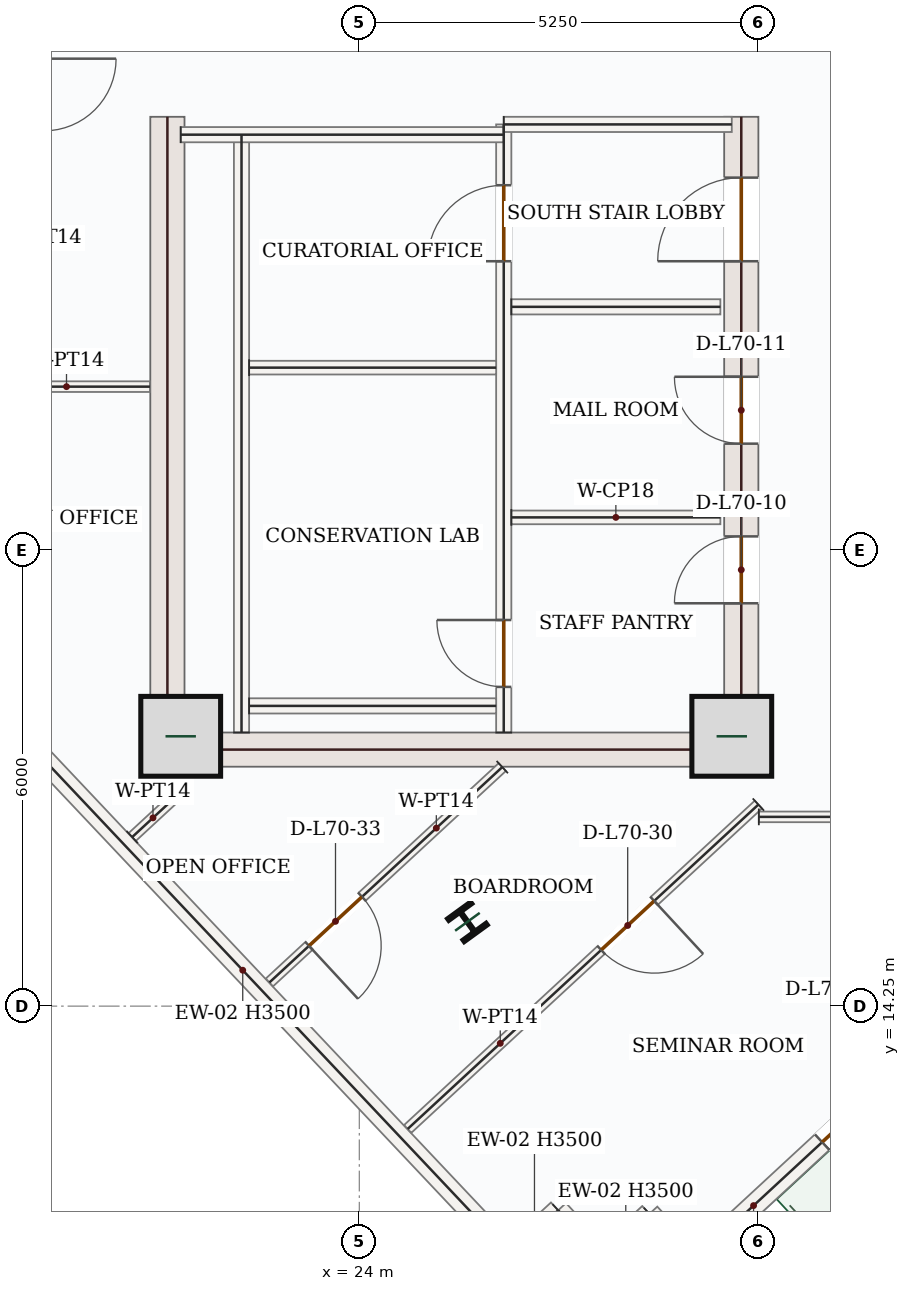
"""IFC4 building model, lengths in metres.
Left out: names, types, materials, properties, quantities, classifications, styles, units other than length and angle.
Written with IfcOpenShell. Run it as: python <this file> out.ifc"""

import sys

from ifc_helpers import new_model, si_unit, direction, frame, frame_2d, origin, origin_2d, place, context, subcontext, project, spatial, rectangle, i_section, extrude, source, transform, mapped, element, fill, save


model = new_model("IFC4")
c1 = context("Model", 3, precision=1e-05, world=origin(), true_north=direction((0.0, 1.0)))
c2 = subcontext(c1, "Body", "Model", "MODEL_VIEW")
j1 = project(units=[si_unit("LENGTHUNIT", "METRE"), si_unit("PLANEANGLEUNIT", "RADIAN")], contexts=[c1])
p1 = place(None, origin())
s1 = spatial("IfcSite", under=j1, at=p1, CompositionType="ELEMENT")
p2 = place(p1, origin())
s2 = spatial("IfcBuilding", under=s1, at=p2, CompositionType="ELEMENT")
p3 = place(p2, frame((0.0, 0.0, 291.6)))
s3 = spatial("IfcBuildingStorey", under=s2, at=p3, CompositionType="ELEMENT", Elevation=291.6)
m1 = source(origin(), c2, "Body", "SweptSolid", [
    extrude(rectangle(XDim=8.55, YDim=0.45, at=frame_2d((4.275, 0.0))), origin(), (0.0, 0.0, 1.0), 3.5),
])
p4 = place(p3, frame((21.475, 17.4, 0.0), z_axis=(0.0, 0.0, 1.0), x_axis=(0.0, 1.0, 0.0)))
e1 = element("IfcWall", 1, at=p4, inside=s3, PredefinedType="SHEAR", context=c2, shape_type="MappedRepresentation", body=[
    mapped(m1, transform((0.0, 0.0, 0.0), x_axis=(1.0, 0.0, 0.0), y_axis=(0.0, 1.0, 0.0), z_axis=(0.0, 0.0, 1.0), scale=1.0)),
])
p5 = place(p3, frame((29.025, 17.4, 0.0), z_axis=(0.0, 0.0, 1.0), x_axis=(0.0, 1.0, 0.0)))
e2 = element("IfcWall", 2, at=p5, inside=s3, PredefinedType="SHEAR", context=c2, shape_type="SweptSolid", body=[
    extrude(rectangle(XDim=8.55, YDim=0.45, at=frame_2d((4.275, 0.0))), origin(), (0.0, 0.0, 1.0), 3.5),
])
p6 = place(p5, frame((6.65, 0.0, 0.0)))
e3 = element("IfcOpeningElement", 3, at=p6, cuts=e2, PredefinedType="OPENING", context=c2, shape_type="SweptSolid", body=[
    extrude(rectangle(XDim=1.1, YDim=2.2, at=frame_2d((0.55, 1.1))), frame((0.0, 0.235, 0.0), z_axis=(0.0, -1.0, 0.0), x_axis=(1.0, 0.0, 0.0)), (0.0, 0.0, 1.0), 0.47),
])
p7 = place(p5, frame((2.15, 0.0, 0.0)))
e4 = element("IfcOpeningElement", 4, at=p7, cuts=e2, PredefinedType="OPENING", context=c2, shape_type="SweptSolid", body=[
    extrude(rectangle(XDim=0.88, YDim=2.1, at=frame_2d((0.44, 1.05))), frame((0.0, 0.235, 0.0), z_axis=(0.0, -1.0, 0.0), x_axis=(1.0, 0.0, 0.0)), (0.0, 0.0, 1.0), 0.47),
])
p8 = place(p5, frame((4.25, 0.0, 0.0)))
e5 = element("IfcOpeningElement", 5, at=p8, cuts=e2, PredefinedType="OPENING", context=c2, shape_type="SweptSolid", body=[
    extrude(rectangle(XDim=0.88, YDim=2.1, at=frame_2d((0.44, 1.05))), frame((0.0, 0.235, 0.0), z_axis=(0.0, -1.0, 0.0), x_axis=(1.0, 0.0, 0.0)), (0.0, 0.0, 1.0), 0.47),
])
m2 = source(origin(), c2, "Body", "SweptSolid", [
    extrude(rectangle(XDim=7.1, YDim=0.45, at=frame_2d((3.55, 0.0))), origin(), (0.0, 0.0, 1.0), 3.5),
])
p9 = place(p3, frame((21.7, 17.625, 0.0), z_axis=(0.0, 0.0, 1.0), x_axis=(1.0, 0.0, 0.0)))
e6 = element("IfcWall", 6, at=p9, inside=s3, PredefinedType="SHEAR", context=c2, shape_type="MappedRepresentation", body=[
    mapped(m2, transform((0.0, 0.0, 0.0), x_axis=(1.0, 0.0, 0.0), y_axis=(0.0, 1.0, 0.0), z_axis=(0.0, 0.0, 1.0), scale=1.0)),
])
m3 = source(origin(), c2, "Body", "SweptSolid", [
    extrude(rectangle(XDim=1.05, YDim=1.05, at=origin_2d()), origin(), (0.0, 0.0, 1.0), 3.75),
])
for number, where, z_axis, x_axis in (
    (7, (21.65, 17.8, 0.0), (0.0, 0.0, 1.0), (1.0, 0.0, 0.0)),
    (8, (28.9, 17.8, 0.0), (0.0, 0.0, 1.0), (1.0, 0.0, 0.0)),
):
    element("IfcColumn", number, at=place(p3, frame(where, z_axis=z_axis, x_axis=x_axis)), inside=s3, PredefinedType="COLUMN", context=c2, shape_type="MappedRepresentation", body=[
        mapped(m3, transform((0.0, 0.0, 0.0), x_axis=(1.0, 0.0, 0.0), y_axis=(0.0, 1.0, 0.0), z_axis=(0.0, 0.0, 1.0), scale=1.0)),
    ])
m4 = source(origin(), c2, "Body", "SweptSolid", [
    extrude(i_section(OverallWidth=0.374, OverallDepth=0.372, WebThickness=0.016, FlangeThickness=0.026, FilletRadius=0.018, at=origin_2d()), origin(), (0.0, 0.0, 1.0), 3.75),
])
p10 = place(p3, frame((25.422, 15.359, 0.0), z_axis=(0.0, 0.0, 1.0), x_axis=(0.809016994375, 0.587785252292, 0.0)))
e9 = element("IfcColumn", 9, at=p10, inside=s3, PredefinedType="COLUMN", context=c2, shape_type="MappedRepresentation", body=[
    mapped(m4, transform((0.0, 0.0, 0.0), x_axis=(1.0, 0.0, 0.0), y_axis=(0.0, 1.0, 0.0), z_axis=(0.0, 0.0, 1.0), scale=1.0)),
])
p11 = place(p3, frame((32.553, 14.74, 0.0), z_axis=(0.0, 0.0, 1.0), x_axis=(-0.734109106874, -0.679031530346, 0.0)))
e10 = element("IfcWall", 10, at=p11, inside=s3, PredefinedType="SOLIDWALL", context=c2, shape_type="SweptSolid", body=[
    extrude(rectangle(XDim=5.665, YDim=0.28, at=frame_2d((2.833, 0.0))), origin(), (0.0, 0.0, 1.0), 3.5),
])
p12 = place(p11, frame((2.307, 0.0, 0.0)))
e11 = element("IfcOpeningElement", 11, at=p12, cuts=e10, PredefinedType="OPENING", context=c2, shape_type="SweptSolid", body=[
    extrude(rectangle(XDim=1.05, YDim=2.15, at=frame_2d((0.525, 1.075))), frame((0.0, 0.15, 0.0), z_axis=(0.0, -1.0, 0.0), x_axis=(1.0, 0.0, 0.0)), (0.0, 0.0, 1.0), 0.3),
])
m5 = source(origin(), c2, "Body", "SweptSolid", [
    extrude(rectangle(XDim=0.85, YDim=0.28, at=frame_2d((0.425, 0.0))), origin(), (0.0, 0.0, 1.0), 3.5),
])
for number, where, z_axis, x_axis in (
    (12, (28.395, 10.893, 0.0), (0.0, 0.0, 1.0), (-0.679, 0.734, 0.0)),
    (13, (27.817, 11.517, 0.0), (0.0, 0.0, 1.0), (-0.734, -0.679, 0.0)),
    (14, (27.193, 10.94, 0.0), (0.0, 0.0, 1.0), (-0.679, 0.734, 0.0)),
    (15, (26.616, 11.564, 0.0), (0.0, 0.0, 1.0), (-0.734, -0.679, 0.0)),
):
    element("IfcWall", number, at=place(p3, frame(where, z_axis=z_axis, x_axis=x_axis)), inside=s3, PredefinedType="SOLIDWALL", context=c2, shape_type="MappedRepresentation", body=[
        mapped(m5, transform((0.0, 0.0, 0.0), x_axis=(1.0, 0.0, 0.0), y_axis=(0.0, 1.0, 0.0), z_axis=(0.0, 0.0, 1.0), scale=1.0)),
    ])
m6 = source(origin(), c2, "Body", "SweptSolid", [
    extrude(rectangle(XDim=10.274, YDim=0.28, at=frame_2d((5.137, 0.0))), origin(), (0.0, 0.0, 1.0), 3.5),
])
p13 = place(p3, frame((25.992, 10.987, 0.0), z_axis=(0.0, 0.0, 1.0), x_axis=(-0.68643580465, 0.727190405667, 0.0)))
e16 = element("IfcWall", 16, at=p13, inside=s3, PredefinedType="SOLIDWALL", context=c2, shape_type="MappedRepresentation", body=[
    mapped(m6, transform((0.0, 0.0, 0.0), x_axis=(1.0, 0.0, 0.0), y_axis=(0.0, 1.0, 0.0), z_axis=(0.0, 0.0, 1.0), scale=1.0)),
])
m7 = source(origin(), c2, "Body", "SweptSolid", [
    extrude(rectangle(XDim=7.87, YDim=0.2, at=frame_2d((3.935, 0.0))), origin(), (0.0, 0.0, 1.0), 3.5),
])
p14 = place(p3, frame((22.45, 17.85, 0.0), z_axis=(0.0, 0.0, 1.0), x_axis=(0.0, 1.0, 0.0)))
e17 = element("IfcWall", 17, at=p14, inside=s3, PredefinedType="SOLIDWALL", context=c2, shape_type="MappedRepresentation", body=[
    mapped(m7, transform((0.0, 0.0, 0.0), x_axis=(1.0, 0.0, 0.0), y_axis=(0.0, 1.0, 0.0), z_axis=(0.0, 0.0, 1.0), scale=1.0)),
])
p15 = place(p3, frame((25.9, 17.85, 0.0), z_axis=(0.0, 0.0, 1.0), x_axis=(0.0, 1.0, 0.0)))
e18 = element("IfcWall", 18, at=p15, inside=s3, PredefinedType="SOLIDWALL", context=c2, shape_type="SweptSolid", body=[
    extrude(rectangle(XDim=8.0, YDim=0.2, at=frame_2d((4.0, 0.0))), origin(), (0.0, 0.0, 1.0), 3.5),
])
p16 = place(p15, frame((6.2, 0.0, 0.0)))
e19 = element("IfcOpeningElement", 19, at=p16, cuts=e18, PredefinedType="OPENING", context=c2, shape_type="SweptSolid", body=[
    extrude(rectangle(XDim=1.0, YDim=2.15, at=frame_2d((0.5, 1.075))), frame((0.0, 0.11, 0.0), z_axis=(0.0, -1.0, 0.0), x_axis=(1.0, 0.0, 0.0)), (0.0, 0.0, 1.0), 0.22),
])
p17 = place(p15, frame((0.6, 0.0, 0.0)))
e20 = element("IfcOpeningElement", 20, at=p17, cuts=e18, PredefinedType="OPENING", context=c2, shape_type="SweptSolid", body=[
    extrude(rectangle(XDim=0.88, YDim=2.1, at=frame_2d((0.44, 1.05))), frame((0.0, 0.11, 0.0), z_axis=(0.0, -1.0, 0.0), x_axis=(1.0, 0.0, 0.0)), (0.0, 0.0, 1.0), 0.22),
])
m8 = source(origin(), c2, "Body", "SweptSolid", [
    extrude(rectangle(XDim=4.25, YDim=0.2, at=frame_2d((2.125, 0.0))), origin(), (0.0, 0.0, 1.0), 3.5),
])
p18 = place(p3, frame((21.65, 25.715, 0.0), z_axis=(0.0, 0.0, 1.0), x_axis=(1.0, 0.0, 0.0)))
e21 = element("IfcWall", 21, at=p18, inside=s3, PredefinedType="SOLIDWALL", context=c2, shape_type="MappedRepresentation", body=[
    mapped(m8, transform((0.0, 0.0, 0.0), x_axis=(1.0, 0.0, 0.0), y_axis=(0.0, 1.0, 0.0), z_axis=(0.0, 0.0, 1.0), scale=1.0)),
])
m9 = source(origin(), c2, "Body", "SweptSolid", [
    extrude(rectangle(XDim=3.0, YDim=0.2, at=frame_2d((1.5, 0.0))), origin(), (0.0, 0.0, 1.0), 3.5),
])
p19 = place(p3, frame((25.9, 25.85, 0.0), z_axis=(0.0, 0.0, 1.0), x_axis=(1.0, 0.0, 0.0)))
e22 = element("IfcWall", 22, at=p19, inside=s3, PredefinedType="SOLIDWALL", context=c2, shape_type="MappedRepresentation", body=[
    mapped(m9, transform((0.0, 0.0, 0.0), x_axis=(1.0, 0.0, 0.0), y_axis=(0.0, 1.0, 0.0), z_axis=(0.0, 0.0, 1.0), scale=1.0)),
])
m10 = source(origin(), c2, "Body", "SweptSolid", [
    extrude(rectangle(XDim=3.25, YDim=0.2, at=frame_2d((1.625, 0.0))), origin(), (0.0, 0.0, 1.0), 3.5),
])
p20 = place(p3, frame((22.55, 18.2, 0.0), z_axis=(0.0, 0.0, 1.0), x_axis=(1.0, 0.0, 0.0)))
e23 = element("IfcWall", 23, at=p20, inside=s3, PredefinedType="SOLIDWALL", context=c2, shape_type="MappedRepresentation", body=[
    mapped(m10, transform((0.0, 0.0, 0.0), x_axis=(1.0, 0.0, 0.0), y_axis=(0.0, 1.0, 0.0), z_axis=(0.0, 0.0, 1.0), scale=1.0)),
])
m11 = source(origin(), c2, "Body", "SweptSolid", [
    extrude(rectangle(XDim=3.25, YDim=0.18, at=frame_2d((1.625, 0.0))), origin(), (0.0, 0.0, 1.0), 3.5),
])
p21 = place(p3, frame((22.55, 22.65, 0.0), z_axis=(0.0, 0.0, 1.0), x_axis=(1.0, 0.0, 0.0)))
e24 = element("IfcWall", 24, at=p21, inside=s3, PredefinedType="PARTITIONING", context=c2, shape_type="MappedRepresentation", body=[
    mapped(m11, transform((0.0, 0.0, 0.0), x_axis=(1.0, 0.0, 0.0), y_axis=(0.0, 1.0, 0.0), z_axis=(0.0, 0.0, 1.0), scale=1.0)),
])
m12 = source(origin(), c2, "Body", "SweptSolid", [
    extrude(rectangle(XDim=2.75, YDim=0.2, at=frame_2d((1.375, 0.0))), origin(), (0.0, 0.0, 1.0), 3.5),
])
p22 = place(p3, frame((26.0, 23.45, 0.0), z_axis=(0.0, 0.0, 1.0), x_axis=(1.0, 0.0, 0.0)))
e25 = element("IfcWall", 25, at=p22, inside=s3, PredefinedType="SOLIDWALL", context=c2, shape_type="MappedRepresentation", body=[
    mapped(m12, transform((0.0, 0.0, 0.0), x_axis=(1.0, 0.0, 0.0), y_axis=(0.0, 1.0, 0.0), z_axis=(0.0, 0.0, 1.0), scale=1.0)),
])
m13 = source(origin(), c2, "Body", "SweptSolid", [
    extrude(rectangle(XDim=2.75, YDim=0.18, at=frame_2d((1.375, 0.0))), origin(), (0.0, 0.0, 1.0), 3.5),
])
p23 = place(p3, frame((26.0, 20.68, 0.0), z_axis=(0.0, 0.0, 1.0), x_axis=(1.0, 0.0, 0.0)))
e26 = element("IfcWall", 26, at=p23, inside=s3, PredefinedType="PARTITIONING", context=c2, shape_type="MappedRepresentation", body=[
    mapped(m13, transform((0.0, 0.0, 0.0), x_axis=(1.0, 0.0, 0.0), y_axis=(0.0, 1.0, 0.0), z_axis=(0.0, 0.0, 1.0), scale=1.0)),
])
p24 = place(p3, frame((25.881, 17.395, 0.0), z_axis=(0.0, 0.0, 1.0), x_axis=(-0.734127876216, -0.679011238024, 0.0)))
e27 = element("IfcWall", 27, at=p24, inside=s3, PredefinedType="PARTITIONING", context=c2, shape_type="SweptSolid", body=[
    extrude(rectangle(XDim=4.173, YDim=0.14, at=frame_2d((2.086, 0.0))), origin(), (0.0, 0.0, 1.0), 3.5),
])
p25 = place(p24, frame((2.514, 0.0, 0.0)))
e28 = element("IfcOpeningElement", 28, at=p25, cuts=e27, PredefinedType="OPENING", context=c2, shape_type="SweptSolid", body=[
    extrude(rectangle(XDim=0.95, YDim=2.15, at=frame_2d((0.475, 1.075))), frame((0.0, 0.08, 0.0), z_axis=(0.0, -1.0, 0.0), x_axis=(1.0, 0.0, 0.0)), (0.0, 0.0, 1.0), 0.16),
])
m14 = source(origin(), c2, "Body", "SweptSolid", [
    extrude(rectangle(XDim=0.745, YDim=0.14, at=frame_2d((0.373, 0.0))), origin(), (0.0, 0.0, 1.0), 3.5),
])
p26 = place(p3, frame((21.012, 16.474, 0.0), z_axis=(0.0, 0.0, 1.0), x_axis=(0.734262819455, 0.678865312095, 0.0)))
e29 = element("IfcWall", 29, at=p26, inside=s3, PredefinedType="PARTITIONING", context=c2, shape_type="MappedRepresentation", body=[
    mapped(m14, transform((0.0, 0.0, 0.0), x_axis=(1.0, 0.0, 0.0), y_axis=(0.0, 1.0, 0.0), z_axis=(0.0, 0.0, 1.0), scale=1.0)),
])
p27 = place(p3, frame((29.25, 16.902, 0.0), z_axis=(0.0, 0.0, 1.0), x_axis=(-0.734113479195, -0.679026803347, 0.0)))
e30 = element("IfcWall", 30, at=p27, inside=s3, PredefinedType="PARTITIONING", context=c2, shape_type="SweptSolid", body=[
    extrude(rectangle(XDim=6.284, YDim=0.14, at=frame_2d((3.142, 0.0))), origin(), (0.0, 0.0, 1.0), 3.5),
])
p28 = place(p27, frame((1.867, 0.0, 0.0)))
e31 = element("IfcOpeningElement", 31, at=p28, cuts=e30, PredefinedType="OPENING", context=c2, shape_type="SweptSolid", body=[
    extrude(rectangle(XDim=0.95, YDim=2.15, at=frame_2d((0.475, 1.075))), frame((0.0, 0.08, 0.0), z_axis=(0.0, -1.0, 0.0), x_axis=(1.0, 0.0, 0.0)), (0.0, 0.0, 1.0), 0.16),
])
m15 = source(origin(), c2, "Body", "SweptSolid", [
    extrude(rectangle(XDim=2.195, YDim=0.14, at=frame_2d((1.098, 0.0))), origin(), (0.0, 0.0, 1.0), 3.5),
])
p29 = place(p3, frame((19.05, 22.4, 0.0), z_axis=(0.0, 0.0, 1.0), x_axis=(1.0, 0.0, 0.0)))
e32 = element("IfcWall", 32, at=p29, inside=s3, PredefinedType="PARTITIONING", context=c2, shape_type="MappedRepresentation", body=[
    mapped(m15, transform((0.0, 0.0, 0.0), x_axis=(1.0, 0.0, 0.0), y_axis=(0.0, 1.0, 0.0), z_axis=(0.0, 0.0, 1.0), scale=1.0)),
])
p30 = place(p3, frame((29.256, 16.74, 0.0), z_axis=(0.0, 0.0, 1.0), x_axis=(1.0, 0.0, 0.0)))
e33 = element("IfcWall", 33, at=p30, inside=s3, PredefinedType="PARTITIONING", context=c2, shape_type="SweptSolid", body=[
    extrude(rectangle(XDim=6.354, YDim=0.14, at=frame_2d((3.177, 0.0))), origin(), (0.0, 0.0, 1.0), 3.5),
])
p31 = place(p30, frame((4.215, 0.0, 0.0)))
e34 = element("IfcOpeningElement", 34, at=p31, cuts=e33, PredefinedType="OPENING", context=c2, shape_type="SweptSolid", body=[
    extrude(rectangle(XDim=0.95, YDim=2.15, at=frame_2d((0.475, 1.075))), frame((0.0, 0.08, 0.0), z_axis=(0.0, -1.0, 0.0), x_axis=(1.0, 0.0, 0.0)), (0.0, 0.0, 1.0), 0.16),
])
m16 = source(origin(), c2, "Body", "SweptSolid", [
    extrude(rectangle(XDim=1.05, YDim=2.15, at=frame_2d((0.525, 1.075))), frame((0.0, 0.025, 0.0), z_axis=(0.0, -1.0, 0.0), x_axis=(1.0, 0.0, 0.0)), (0.0, 0.0, 1.0), 0.05),
])
p32 = place(p12, origin())
e35 = element("IfcDoor", 35, at=p32, inside=s3, OperationType="SINGLE_SWING_LEFT", PredefinedType="DOOR", context=c2, shape_type="MappedRepresentation", body=[
    mapped(m16, transform((0.0, 0.0, 0.0), x_axis=(1.0, 0.0, 0.0), y_axis=(0.0, 1.0, 0.0), z_axis=(0.0, 0.0, 1.0), scale=1.0)),
])
fill(e11, e35)
m17 = source(origin(), c2, "Body", "SweptSolid", [
    extrude(rectangle(XDim=1.0, YDim=2.15, at=frame_2d((0.5, 1.075))), frame((0.0, 0.025, 0.0), z_axis=(0.0, -1.0, 0.0), x_axis=(1.0, 0.0, 0.0)), (0.0, 0.0, 1.0), 0.05),
])
p33 = place(p16, origin())
e36 = element("IfcDoor", 36, at=p33, inside=s3, OperationType="SINGLE_SWING_LEFT", PredefinedType="DOOR", context=c2, shape_type="MappedRepresentation", body=[
    mapped(m17, transform((0.0, 0.0, 0.0), x_axis=(1.0, 0.0, 0.0), y_axis=(0.0, 1.0, 0.0), z_axis=(0.0, 0.0, 1.0), scale=1.0)),
])
fill(e19, e36)
m18 = source(origin(), c2, "Body", "SweptSolid", [
    extrude(rectangle(XDim=0.88, YDim=2.1, at=frame_2d((0.44, 1.05))), frame((0.0, 0.025, 0.0), z_axis=(0.0, -1.0, 0.0), x_axis=(1.0, 0.0, 0.0)), (0.0, 0.0, 1.0), 0.05),
])
p34 = place(p17, origin())
e37 = element("IfcDoor", 37, at=p34, inside=s3, OperationType="SINGLE_SWING_RIGHT", PredefinedType="DOOR", context=c2, shape_type="MappedRepresentation", body=[
    mapped(m18, transform((0.0, 0.0, 0.0), x_axis=(1.0, 0.0, 0.0), y_axis=(0.0, 1.0, 0.0), z_axis=(0.0, 0.0, 1.0), scale=1.0)),
])
fill(e20, e37)
m19 = source(origin(), c2, "Body", "SweptSolid", [
    extrude(rectangle(XDim=1.1, YDim=2.2, at=frame_2d((0.55, 1.1))), frame((0.0, 0.025, 0.0), z_axis=(0.0, -1.0, 0.0), x_axis=(1.0, 0.0, 0.0)), (0.0, 0.0, 1.0), 0.05),
])
p35 = place(p6, origin())
e38 = element("IfcDoor", 38, at=p35, inside=s3, OperationType="SINGLE_SWING_LEFT", PredefinedType="DOOR", context=c2, shape_type="MappedRepresentation", body=[
    mapped(m19, transform((0.0, 0.0, 0.0), x_axis=(1.0, 0.0, 0.0), y_axis=(0.0, 1.0, 0.0), z_axis=(0.0, 0.0, 1.0), scale=1.0)),
])
fill(e3, e38)
p36 = place(p7, origin())
e39 = element("IfcDoor", 39, at=p36, inside=s3, OperationType="SINGLE_SWING_LEFT", PredefinedType="DOOR", context=c2, shape_type="MappedRepresentation", body=[
    mapped(m18, transform((0.0, 0.0, 0.0), x_axis=(1.0, 0.0, 0.0), y_axis=(0.0, 1.0, 0.0), z_axis=(0.0, 0.0, 1.0), scale=1.0)),
])
fill(e4, e39)
p37 = place(p8, origin())
e40 = element("IfcDoor", 40, at=p37, inside=s3, OperationType="SINGLE_SWING_RIGHT", PredefinedType="DOOR", context=c2, shape_type="MappedRepresentation", body=[
    mapped(m18, transform((0.0, 0.0, 0.0), x_axis=(1.0, 0.0, 0.0), y_axis=(0.0, 1.0, 0.0), z_axis=(0.0, 0.0, 1.0), scale=1.0)),
])
fill(e5, e40)
m20 = source(origin(), c2, "Body", "SweptSolid", [
    extrude(rectangle(XDim=0.95, YDim=2.15, at=frame_2d((0.475, 1.075))), frame((0.0, 0.025, 0.0), z_axis=(0.0, -1.0, 0.0), x_axis=(1.0, 0.0, 0.0)), (0.0, 0.0, 1.0), 0.05),
])
p38 = place(p28, origin())
e41 = element("IfcDoor", 41, at=p38, inside=s3, OperationType="SINGLE_SWING_LEFT", PredefinedType="DOOR", context=c2, shape_type="MappedRepresentation", body=[
    mapped(m20, transform((0.0, 0.0, 0.0), x_axis=(1.0, 0.0, 0.0), y_axis=(0.0, 1.0, 0.0), z_axis=(0.0, 0.0, 1.0), scale=1.0)),
])
fill(e31, e41)
p39 = place(p25, origin())
e42 = element("IfcDoor", 42, at=p39, inside=s3, OperationType="SINGLE_SWING_RIGHT", PredefinedType="DOOR", context=c2, shape_type="MappedRepresentation", body=[
    mapped(m20, transform((0.0, 0.0, 0.0), x_axis=(1.0, 0.0, 0.0), y_axis=(0.0, 1.0, 0.0), z_axis=(0.0, 0.0, 1.0), scale=1.0)),
])
fill(e28, e42)
save(model, sys.argv[1])
